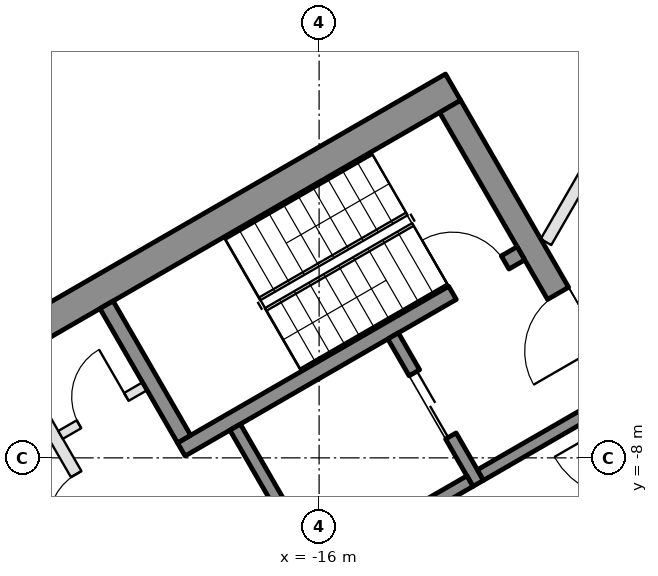
"""IFC4 building model, lengths in metres.
Left out: names, types, materials, properties, quantities, classifications, styles, units other than length and angle.
Written with IfcOpenShell. Run it as: python <this file> out.ifc"""

import sys

from ifc_helpers import new_model, si_unit, direction, frame, frame_2d, origin, place, context, subcontext, project, spatial, rectangle, extrude, element, fill, save


model = new_model("IFC4")
c1 = context("Model", 3, precision=1e-05, world=origin(), true_north=direction((0.0, 1.0)))
c2 = subcontext(c1, "Body", "Model", "MODEL_VIEW")
j1 = project(units=[si_unit("LENGTHUNIT", "METRE"), si_unit("PLANEANGLEUNIT", "RADIAN")], contexts=[c1])
p1 = place(None, origin())
s1 = spatial("IfcSite", under=j1, at=p1, CompositionType="ELEMENT")
p2 = place(p1, origin())
s2 = spatial("IfcBuilding", under=s1, at=p2, CompositionType="ELEMENT")
p3 = place(p2, frame((0.0, 0.0, 254.1)))
s3 = spatial("IfcBuildingStorey", under=s2, at=p3, CompositionType="ELEMENT", Elevation=254.1)
p4 = place(p3, frame((-20.309, 1.934, 0.0), z_axis=(0.0, 0.0, 1.0), x_axis=(-0.499992114976, -0.866029956157, 0.0)))
e1 = element("IfcWall", 1, at=p4, inside=s3, PredefinedType="SOLIDWALL", context=c2, shape_type="SweptSolid", body=[
    extrude(rectangle(XDim=6.74, YDim=0.35, at=frame_2d((3.37, 0.0))), origin(), (0.0, 0.0, 1.0), 3.55),
])
p5 = place(p4, frame((3.57, 0.0, 0.0)))
e2 = element("IfcOpeningElement", 2, at=p5, cuts=e1, PredefinedType="OPENING", context=c2, shape_type="SweptSolid", body=[
    extrude(rectangle(XDim=2.4, YDim=2.4, at=frame_2d((1.2, 1.2))), frame((0.0, 0.185, 0.0), z_axis=(0.0, -1.0, 0.0), x_axis=(1.0, 0.0, 0.0)), (0.0, 0.0, 1.0), 0.37),
])
p6 = place(p4, frame((0.77, 0.0, 0.3)))
e3 = element("IfcOpeningElement", 3, at=p6, cuts=e1, PredefinedType="OPENING", context=c2, shape_type="SweptSolid", body=[
    extrude(rectangle(XDim=2.5, YDim=2.65, at=frame_2d((1.25, 1.325))), frame((0.0, 0.185, 0.0), z_axis=(0.0, -1.0, 0.0), x_axis=(1.0, 0.0, 0.0)), (0.0, 0.0, 1.0), 0.37),
])
p7 = place(p3, frame((-13.797, -1.903, 0.0), z_axis=(0.0, 0.0, 1.0), x_axis=(-0.866025009528, -0.500000682871, 0.0)))
e4 = element("IfcWall", 4, at=p7, inside=s3, PredefinedType="SHEAR", context=c2, shape_type="SweptSolid", body=[
    extrude(rectangle(XDim=14.837, YDim=0.5, at=frame_2d((7.418, 0.0))), origin(), (0.0, 0.0, 1.0), 3.5),
])
p8 = place(p3, frame((-13.845, -2.22, 0.0), z_axis=(0.0, 0.0, 1.0), x_axis=(0.500004234368, -0.866022959057, 0.0)))
e5 = element("IfcWall", 5, at=p8, inside=s3, PredefinedType="SHEAR", context=c2, shape_type="SweptSolid", body=[
    extrude(rectangle(XDim=10.0, YDim=0.4, at=frame_2d((5.0, 0.0))), origin(), (0.0, 0.0, 1.0), 3.5),
])
p9 = place(p8, frame((3.55, 0.0, 0.0)))
e6 = element("IfcOpeningElement", 6, at=p9, cuts=e5, PredefinedType="OPENING", context=c2, shape_type="SweptSolid", body=[
    extrude(rectangle(XDim=1.1, YDim=2.1, at=frame_2d((0.55, 1.05))), frame((0.0, 0.21, 0.0), z_axis=(0.0, -1.0, 0.0), x_axis=(1.0, 0.0, 0.0)), (0.0, 0.0, 1.0), 0.42),
])
p10 = place(p8, frame((5.85, 0.0, 0.0)))
e7 = element("IfcOpeningElement", 7, at=p10, cuts=e5, PredefinedType="OPENING", context=c2, shape_type="SweptSolid", body=[
    extrude(rectangle(XDim=1.4, YDim=2.1, at=frame_2d((0.7, 1.05))), frame((0.0, 0.21, 0.0), z_axis=(0.0, -1.0, 0.0), x_axis=(1.0, 0.0, 0.0)), (0.0, 0.0, 1.0), 0.42),
])
p11 = place(p3, frame((-12.681, -4.636, 0.0), z_axis=(0.0, 0.0, 1.0), x_axis=(-0.866021702275, -0.500006411147, 0.0)))
e8 = element("IfcWall", 8, at=p11, inside=s3, PredefinedType="SHEAR", context=c2, shape_type="SweptSolid", body=[
    extrude(rectangle(XDim=6.45, YDim=0.25, at=frame_2d((3.225, 0.0))), origin(), (0.0, 0.0, 1.0), 3.5),
])
p12 = place(p11, frame((0.3, 0.0, 0.0)))
e9 = element("IfcOpeningElement", 9, at=p12, cuts=e8, PredefinedType="OPENING", context=c2, shape_type="SweptSolid", body=[
    extrude(rectangle(XDim=1.0, YDim=2.1, at=frame_2d((0.5, 1.05))), frame((0.0, 0.135, 0.0), z_axis=(0.0, -1.0, 0.0), x_axis=(1.0, 0.0, 0.0)), (0.0, 0.0, 1.0), 0.27),
])
p13 = place(p3, frame((-19.496, -5.482, 0.0), z_axis=(0.0, 0.0, 1.0), x_axis=(0.499990435942, -0.866030925526, 0.0)))
e10 = element("IfcWall", 10, at=p13, inside=s3, PredefinedType="SHEAR", context=c2, shape_type="SweptSolid", body=[
    extrude(rectangle(XDim=2.55, YDim=0.25, at=frame_2d((1.275, 0.0))), origin(), (0.0, 0.0, 1.0), 3.5),
])
p14 = place(p3, frame((-17.381, -7.495, 0.0), z_axis=(0.0, 0.0, 1.0), x_axis=(0.500011755427, -0.866018616679, 0.0)))
e11 = element("IfcWall", 11, at=p14, inside=s3, PredefinedType="SHEAR", context=c2, shape_type="SweptSolid", body=[
    extrude(rectangle(XDim=2.8, YDim=0.2, at=frame_2d((1.4, 0.0))), origin(), (0.0, 0.0, 1.0), 3.5),
])
p15 = place(p3, frame((-14.783, -5.995, 0.0), z_axis=(0.0, 0.0, 1.0), x_axis=(0.49994636267, -0.866056369097, 0.0)))
e12 = element("IfcWall", 12, at=p15, inside=s3, PredefinedType="SHEAR", context=c2, shape_type="SweptSolid", body=[
    extrude(rectangle(XDim=2.8, YDim=0.2, at=frame_2d((1.4, 0.0))), origin(), (0.0, 0.0, 1.0), 3.5),
])
p16 = place(p15, frame((0.7, 0.0, 0.0)))
e13 = element("IfcOpeningElement", 13, at=p16, cuts=e12, PredefinedType="OPENING", context=c2, shape_type="SweptSolid", body=[
    extrude(rectangle(XDim=1.2, YDim=2.1, at=frame_2d((0.6, 1.05))), frame((0.0, 0.11, 0.0), z_axis=(0.0, -1.0, 0.0), x_axis=(1.0, 0.0, 0.0)), (0.0, 0.0, 1.0), 0.22),
])
p17 = place(p3, frame((-13.52, -8.383, 0.0), z_axis=(0.0, 0.0, 1.0), x_axis=(-0.866034573852, -0.49998411664, 0.0)))
e14 = element("IfcWall", 14, at=p17, inside=s3, PredefinedType="SHEAR", context=c2, shape_type="SweptSolid", body=[
    extrude(rectangle(XDim=2.8, YDim=0.2, at=frame_2d((1.4, 0.0))), origin(), (0.0, 0.0, 1.0), 3.5),
])
p18 = place(p3, frame((-11.268, -7.083, 0.0), z_axis=(0.0, 0.0, 1.0), x_axis=(-0.866050077142, -0.499957262057, 0.0)))
e15 = element("IfcWall", 15, at=p18, inside=s3, PredefinedType="SHEAR", context=c2, shape_type="SweptSolid", body=[
    extrude(rectangle(XDim=2.4, YDim=0.2, at=frame_2d((1.2, 0.0))), origin(), (0.0, 0.0, 1.0), 3.5),
])
p19 = place(p3, frame((-21.076, -6.395, 0.0), z_axis=(0.0, 0.0, 1.0), x_axis=(0.50001468107, -0.866016927499, 0.0)))
e16 = element("IfcWall", 16, at=p19, inside=s3, PredefinedType="PARTITIONING", context=c2, shape_type="SweptSolid", body=[
    extrude(rectangle(XDim=5.4, YDim=0.2, at=frame_2d((2.7, 0.0))), origin(), (0.0, 0.0, 1.0), 3.5),
])
p20 = place(p19, frame((2.163, 0.0, 0.0)))
e17 = element("IfcOpeningElement", 17, at=p20, cuts=e16, PredefinedType="OPENING", context=c2, shape_type="SweptSolid", body=[
    extrude(rectangle(XDim=0.9, YDim=2.1, at=frame_2d((0.45, 1.05))), frame((0.0, 0.11, 0.0), z_axis=(0.0, -1.0, 0.0), x_axis=(1.0, 0.0, 0.0)), (0.0, 0.0, 1.0), 0.22),
])
p21 = place(p19, frame((4.038, 0.0, 0.0)))
e18 = element("IfcOpeningElement", 18, at=p21, cuts=e16, PredefinedType="OPENING", context=c2, shape_type="SweptSolid", body=[
    extrude(rectangle(XDim=0.9, YDim=2.1, at=frame_2d((0.45, 1.05))), frame((0.0, 0.11, 0.0), z_axis=(0.0, -1.0, 0.0), x_axis=(1.0, 0.0, 0.0)), (0.0, 0.0, 1.0), 0.22),
])
p22 = place(p3, frame((-18.866, -6.822, 0.0), z_axis=(0.0, 0.0, 1.0), x_axis=(-0.866028054938, -0.499995408039, 0.0)))
e19 = element("IfcWall", 19, at=p22, inside=s3, PredefinedType="PARTITIONING", context=c2, shape_type="SweptSolid", body=[
    extrude(rectangle(XDim=1.6, YDim=0.15, at=frame_2d((0.8, 0.0))), origin(), (0.0, 0.0, 1.0), 3.5),
])
p23 = place(p22, frame((0.35, 0.0, 0.0)))
e20 = element("IfcOpeningElement", 20, at=p23, cuts=e19, PredefinedType="OPENING", context=c2, shape_type="SweptSolid", body=[
    extrude(rectangle(XDim=0.9, YDim=2.1, at=frame_2d((0.45, 1.05))), frame((0.0, 0.085, 0.0), z_axis=(0.0, -1.0, 0.0), x_axis=(1.0, 0.0, 0.0)), (0.0, 0.0, 1.0), 0.17),
])
p24 = place(p3, frame((-12.269, -4.45, 0.0), z_axis=(0.0, 0.0, 1.0), x_axis=(0.500004836318, 0.866022611517, 0.0)))
e21 = element("IfcWall", 21, at=p24, inside=s3, PredefinedType="PARTITIONING", context=c2, shape_type="SweptSolid", body=[
    extrude(rectangle(XDim=5.488, YDim=0.2, at=frame_2d((2.744, 0.0))), origin(), (0.0, 0.0, 1.0), 3.0),
])
p25 = place(p24, frame((2.244, 0.0, 0.0)))
e22 = element("IfcOpeningElement", 22, at=p25, cuts=e21, PredefinedType="OPENING", context=c2, shape_type="SweptSolid", body=[
    extrude(rectangle(XDim=1.0, YDim=2.1, at=frame_2d((0.5, 1.05))), frame((0.0, 0.11, 0.0), z_axis=(0.0, -1.0, 0.0), x_axis=(1.0, 0.0, 0.0)), (0.0, 0.0, 1.0), 0.22),
])
p26 = place(p16, origin())
e23 = element("IfcDoor", 23, at=p26, inside=s3, OperationType="DOUBLE_DOOR_SLIDING", PredefinedType="DOOR", context=c2, shape_type="SweptSolid", body=[
    extrude(rectangle(XDim=1.2, YDim=2.1, at=frame_2d((0.6, 1.05))), frame((0.0, 0.025, 0.0), z_axis=(0.0, -1.0, 0.0), x_axis=(1.0, 0.0, 0.0)), (0.0, 0.0, 1.0), 0.05),
])
fill(e13, e23)
p27 = place(p23, frame((0.9, 0.0, 0.0), z_axis=(0.0, 0.0, 1.0), x_axis=(-1.0, 0.0, 0.0)))
e24 = element("IfcDoor", 24, at=p27, inside=s3, OperationType="SINGLE_SWING_RIGHT", PredefinedType="DOOR", context=c2, shape_type="SweptSolid", body=[
    extrude(rectangle(XDim=0.9, YDim=2.1, at=frame_2d((0.45, 1.05))), frame((0.0, 0.025, 0.0), z_axis=(0.0, -1.0, 0.0), x_axis=(1.0, 0.0, 0.0)), (0.0, 0.0, 1.0), 0.05),
])
fill(e20, e24)
p28 = place(p20, frame((0.9, 0.0, 0.0), z_axis=(0.0, 0.0, 1.0), x_axis=(-1.0, 0.0, 0.0)))
e25 = element("IfcDoor", 25, at=p28, inside=s3, OperationType="SINGLE_SWING_LEFT", PredefinedType="DOOR", context=c2, shape_type="SweptSolid", body=[
    extrude(rectangle(XDim=0.9, YDim=2.1, at=frame_2d((0.45, 1.05))), frame((0.0, 0.025, 0.0), z_axis=(0.0, -1.0, 0.0), x_axis=(1.0, 0.0, 0.0)), (0.0, 0.0, 1.0), 0.05),
])
fill(e17, e25)
p29 = place(p9, frame((1.1, 0.0, 0.0), z_axis=(0.0, 0.0, 1.0), x_axis=(-1.0, 0.0, 0.0)))
e26 = element("IfcDoor", 26, at=p29, inside=s3, OperationType="SINGLE_SWING_LEFT", PredefinedType="DOOR", context=c2, shape_type="SweptSolid", body=[
    extrude(rectangle(XDim=1.1, YDim=2.1, at=frame_2d((0.55, 1.05))), frame((0.0, 0.025, 0.0), z_axis=(0.0, -1.0, 0.0), x_axis=(1.0, 0.0, 0.0)), (0.0, 0.0, 1.0), 0.05),
])
fill(e6, e26)
p30 = place(p12, frame((1.0, 0.0, 0.0), z_axis=(0.0, 0.0, 1.0), x_axis=(-1.0, 0.0, 0.0)))
e27 = element("IfcDoor", 27, at=p30, inside=s3, OperationType="SINGLE_SWING_LEFT", PredefinedType="DOOR", context=c2, shape_type="SweptSolid", body=[
    extrude(rectangle(XDim=1.0, YDim=2.1, at=frame_2d((0.5, 1.05))), frame((0.0, 0.025, 0.0), z_axis=(0.0, -1.0, 0.0), x_axis=(1.0, 0.0, 0.0)), (0.0, 0.0, 1.0), 0.05),
])
fill(e9, e27)
save(model, sys.argv[1])
